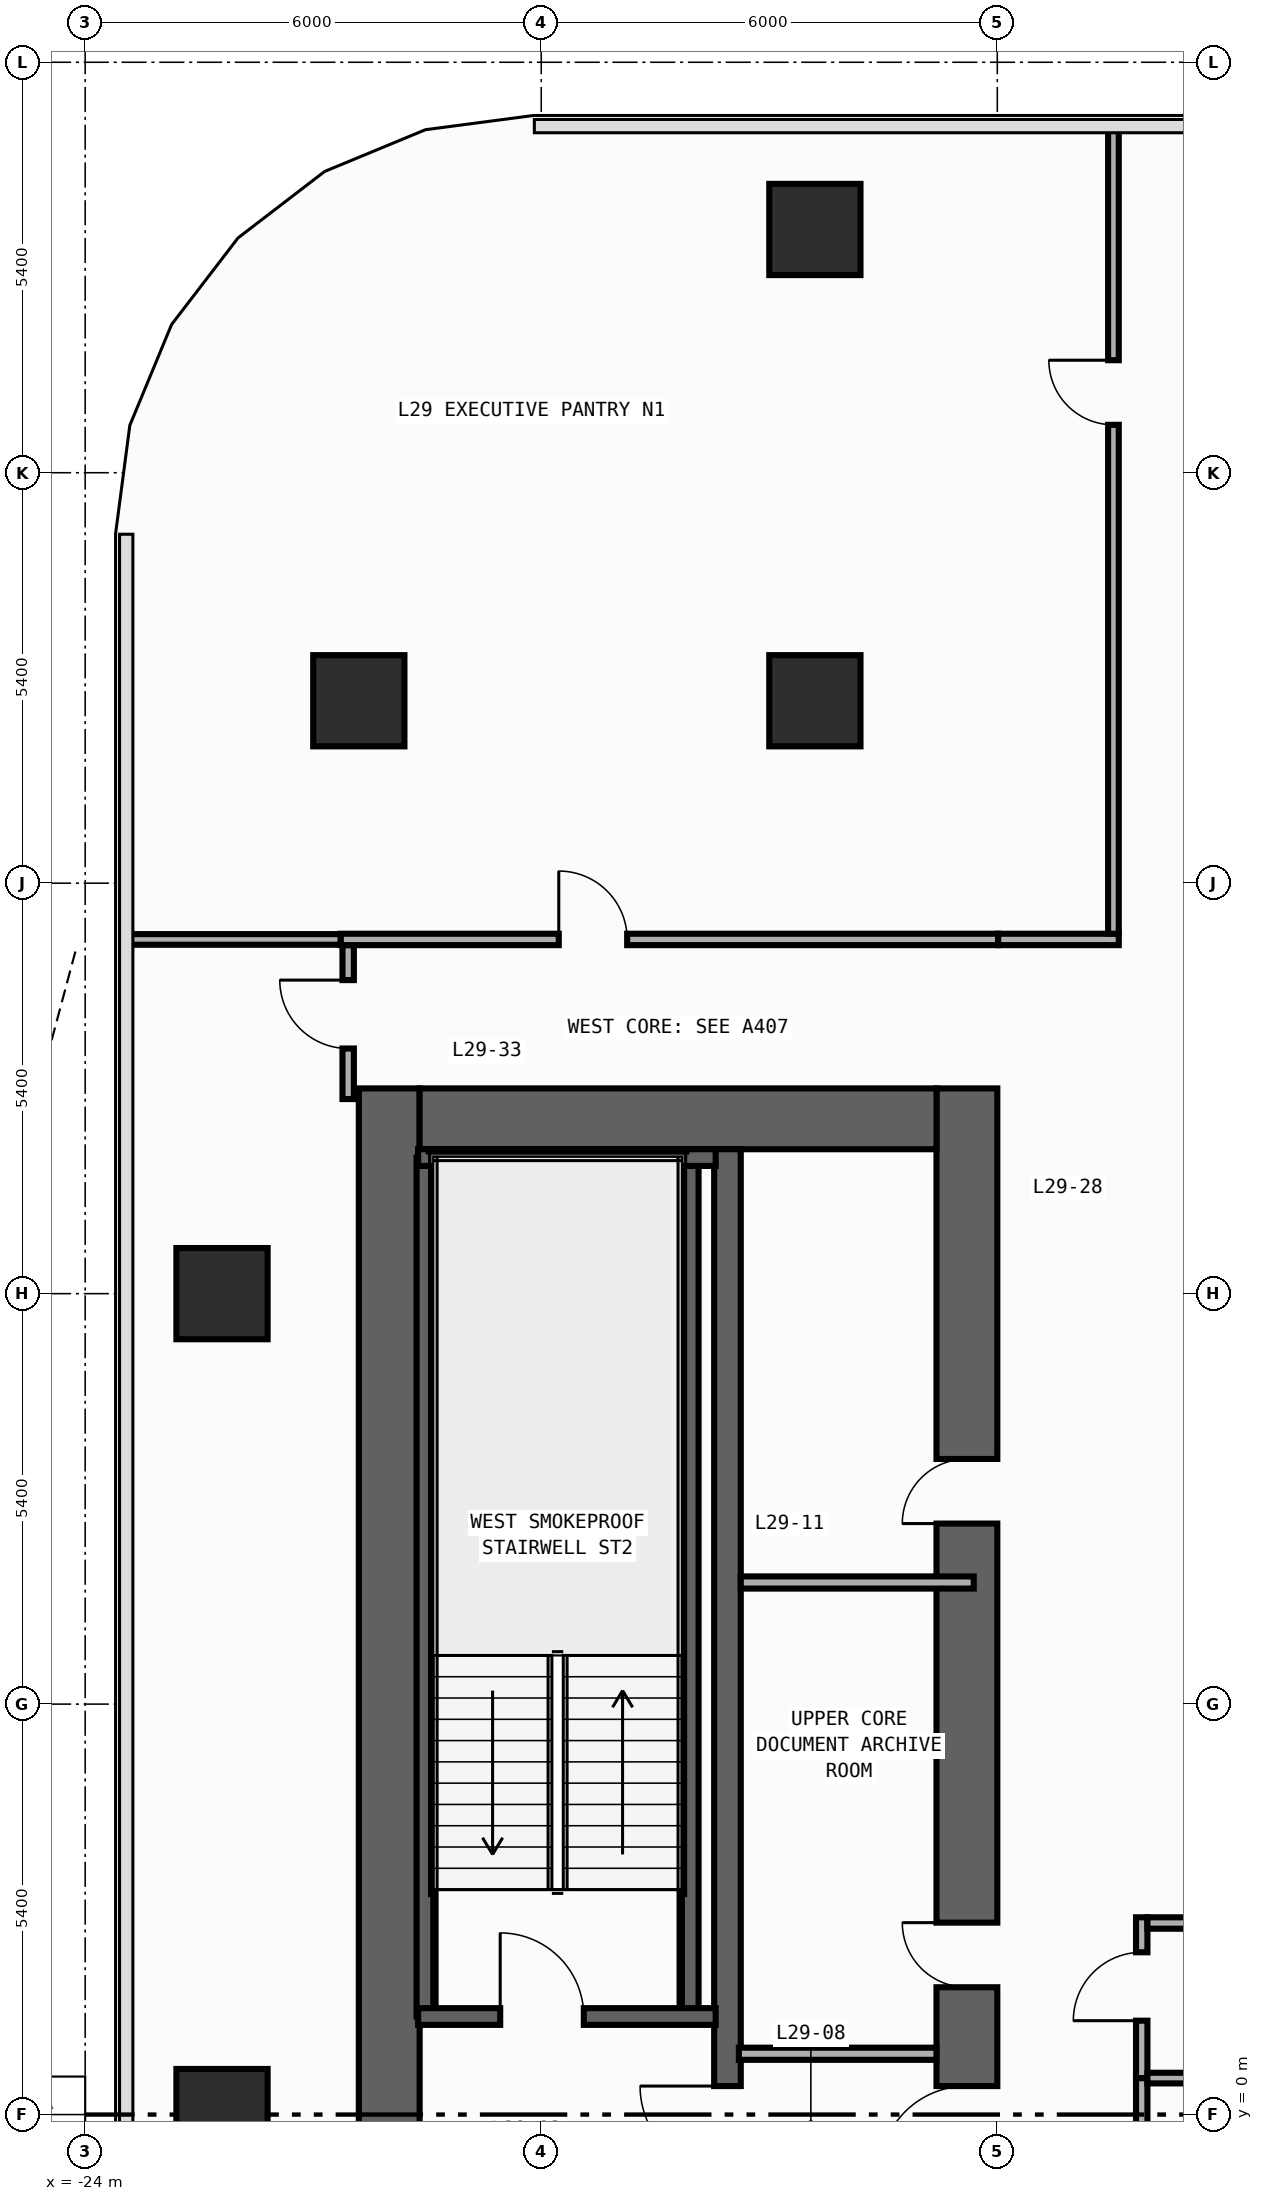
"""IFC4 building model, lengths in metres.
Left out: names, types, materials, properties, quantities, classifications, styles, units other than length and angle.
Written with IfcOpenShell. Run it as: python <this file> out.ifc"""

import sys

from ifc_helpers import new_model, si_unit, direction, frame, frame_2d, origin, origin_2d, place, context, subcontext, project, spatial, rectangle, extrude, element, fill, save


model = new_model("IFC4")
c1 = context("Model", 3, precision=1e-05, world=origin(), true_north=direction((0.0, 1.0)))
c2 = subcontext(c1, "Body", "Model", "MODEL_VIEW")
j1 = project(units=[si_unit("LENGTHUNIT", "METRE"), si_unit("PLANEANGLEUNIT", "RADIAN")], contexts=[c1])
p1 = place(None, origin())
s1 = spatial("IfcSite", under=j1, at=p1, CompositionType="ELEMENT")
p2 = place(p1, origin())
s2 = spatial("IfcBuilding", under=s1, at=p2, CompositionType="ELEMENT")
p3 = place(p2, frame((0.0, 0.0, 126.8)))
s3 = spatial("IfcBuildingStorey", under=s2, at=p3, CompositionType="ELEMENT", Elevation=126.8)
p4 = place(p3, frame((-20.0, -13.5, 0.0), z_axis=(0.0, 0.0, 1.0), x_axis=(0.0, 1.0, 0.0)))
e1 = element("IfcWall", 1, at=p4, inside=s3, PredefinedType="SHEAR", context=c2, shape_type="SweptSolid", body=[
    extrude(rectangle(XDim=27.0, YDim=0.8, at=frame_2d((13.5, 0.0))), origin(), (0.0, 0.0, 1.0), 3.94),
])
p5 = place(p3, frame((-12.4, -13.5, 0.0), z_axis=(0.0, 0.0, 1.0), x_axis=(0.0, 1.0, 0.0)))
e2 = element("IfcWall", 2, at=p5, inside=s3, PredefinedType="SHEAR", context=c2, shape_type="SweptSolid", body=[
    extrude(rectangle(XDim=27.0, YDim=0.8, at=frame_2d((13.5, 0.0))), origin(), (0.0, 0.0, 1.0), 3.94),
])
p6 = place(p5, frame((10.35, 0.0, 0.0)))
e3 = element("IfcOpeningElement", 3, at=p6, cuts=e2, PredefinedType="OPENING", context=c2, shape_type="SweptSolid", body=[
    extrude(rectangle(XDim=1.1, YDim=2.2, at=frame_2d((0.55, 1.1))), frame((0.0, 0.41, 0.0), z_axis=(0.0, -1.0, 0.0), x_axis=(1.0, 0.0, 0.0)), (0.0, 0.0, 1.0), 0.82),
])
p7 = place(p5, frame((7.15, 0.0, 0.0)))
e4 = element("IfcOpeningElement", 4, at=p7, cuts=e2, PredefinedType="OPENING", context=c2, shape_type="SweptSolid", body=[
    extrude(rectangle(XDim=1.1, YDim=2.2, at=frame_2d((0.55, 1.1))), frame((0.0, 0.41, 0.0), z_axis=(0.0, -1.0, 0.0), x_axis=(1.0, 0.0, 0.0)), (0.0, 0.0, 1.0), 0.82),
])
p8 = place(p5, frame((3.95, 0.0, 0.0)))
e5 = element("IfcOpeningElement", 5, at=p8, cuts=e2, PredefinedType="OPENING", context=c2, shape_type="SweptSolid", body=[
    extrude(rectangle(XDim=1.1, YDim=2.2, at=frame_2d((0.55, 1.1))), frame((0.0, 0.41, 0.0), z_axis=(0.0, -1.0, 0.0), x_axis=(1.0, 0.0, 0.0)), (0.0, 0.0, 1.0), 0.82),
])
p9 = place(p5, frame((15.175, 0.0, 0.0)))
e6 = element("IfcOpeningElement", 6, at=p9, cuts=e2, PredefinedType="OPENING", context=c2, shape_type="SweptSolid", body=[
    extrude(rectangle(XDim=0.85, YDim=2.1, at=frame_2d((0.425, 1.05))), frame((0.0, 0.41, 0.0), z_axis=(0.0, -1.0, 0.0), x_axis=(1.0, 0.0, 0.0)), (0.0, 0.0, 1.0), 0.82),
])
p10 = place(p5, frame((21.275, 0.0, 0.0)))
e7 = element("IfcOpeningElement", 7, at=p10, cuts=e2, PredefinedType="OPENING", context=c2, shape_type="SweptSolid", body=[
    extrude(rectangle(XDim=0.85, YDim=2.1, at=frame_2d((0.425, 1.05))), frame((0.0, 0.41, 0.0), z_axis=(0.0, -1.0, 0.0), x_axis=(1.0, 0.0, 0.0)), (0.0, 0.0, 1.0), 0.82),
])
p11 = place(p5, frame((12.725, 0.0, 0.0)))
e8 = element("IfcOpeningElement", 8, at=p11, cuts=e2, PredefinedType="OPENING", context=c2, shape_type="SweptSolid", body=[
    extrude(rectangle(XDim=1.15, YDim=2.2, at=frame_2d((0.575, 1.1))), frame((0.0, 0.41, 0.0), z_axis=(0.0, -1.0, 0.0), x_axis=(1.0, 0.0, 0.0)), (0.0, 0.0, 1.0), 0.82),
])
p12 = place(p5, frame((1.625, 0.0, 0.0)))
e9 = element("IfcOpeningElement", 9, at=p12, cuts=e2, PredefinedType="OPENING", context=c2, shape_type="SweptSolid", body=[
    extrude(rectangle(XDim=0.85, YDim=2.1, at=frame_2d((0.425, 1.05))), frame((0.0, 0.41, 0.0), z_axis=(0.0, -1.0, 0.0), x_axis=(1.0, 0.0, 0.0)), (0.0, 0.0, 1.0), 0.82),
])
p13 = place(p3, frame((-19.6, 13.1, 0.0), z_axis=(0.0, 0.0, 1.0), x_axis=(1.0, 0.0, 0.0)))
e10 = element("IfcWall", 10, at=p13, inside=s3, PredefinedType="SHEAR", context=c2, shape_type="SweptSolid", body=[
    extrude(rectangle(XDim=6.8, YDim=0.8, at=frame_2d((3.4, 0.0))), origin(), (0.0, 0.0, 1.0), 3.94),
])
p14 = place(p3, frame((-15.55, -12.7, 0.0), z_axis=(0.0, 0.0, 1.0), x_axis=(0.0, 1.0, 0.0)))
e11 = element("IfcWall", 11, at=p14, inside=s3, PredefinedType="SHEAR", context=c2, shape_type="SweptSolid", body=[
    extrude(rectangle(XDim=25.4, YDim=0.35, at=frame_2d((12.7, 0.0))), origin(), (0.0, 0.0, 1.0), 3.94),
])
p15 = place(p14, frame((11.925, 0.0, 0.0)))
e12 = element("IfcOpeningElement", 12, at=p15, cuts=e11, PredefinedType="OPENING", context=c2, shape_type="SweptSolid", body=[
    extrude(rectangle(XDim=1.15, YDim=2.2, at=frame_2d((0.575, 1.1))), frame((0.0, 0.185, 0.0), z_axis=(0.0, -1.0, 0.0), x_axis=(1.0, 0.0, 0.0)), (0.0, 0.0, 1.0), 0.37),
])
p16 = place(p14, frame((0.825, 0.0, 0.0)))
e13 = element("IfcOpeningElement", 13, at=p16, cuts=e11, PredefinedType="OPENING", context=c2, shape_type="SweptSolid", body=[
    extrude(rectangle(XDim=0.85, YDim=2.1, at=frame_2d((0.425, 1.05))), frame((0.0, 0.185, 0.0), z_axis=(0.0, -1.0, 0.0), x_axis=(1.0, 0.0, 0.0)), (0.0, 0.0, 1.0), 0.37),
])
for number, where, z_axis, x_axis in (
    (14, (-16.04, 1.29, 0.0), (0.0, 0.0, 1.0), (0.0, 1.0, 0.0)),
    (15, (-19.53, 1.29, 0.0), (0.0, 0.0, 1.0), (0.0, 1.0, 0.0)),
):
    element("IfcWall", number, at=place(p3, frame(where, z_axis=z_axis, x_axis=x_axis)), inside=s3, PredefinedType="SHEAR", context=c2, shape_type="SweptSolid", body=[
        extrude(rectangle(XDim=11.3, YDim=0.22, at=frame_2d((5.65, 0.0))), origin(), (0.0, 0.0, 1.0), 3.94),
    ])
p17 = place(p3, frame((-19.62, 12.59, 0.0), z_axis=(0.0, 0.0, 1.0), x_axis=(1.0, 0.0, 0.0)))
e16 = element("IfcWall", 16, at=p17, inside=s3, PredefinedType="SHEAR", context=c2, shape_type="SweptSolid", body=[
    extrude(rectangle(XDim=3.915, YDim=0.22, at=frame_2d((1.958, 0.0))), origin(), (0.0, 0.0, 1.0), 3.94),
])
p18 = place(p3, frame((-19.62, 1.29, 0.0), z_axis=(0.0, 0.0, 1.0), x_axis=(1.0, 0.0, 0.0)))
e17 = element("IfcWall", 17, at=p18, inside=s3, PredefinedType="SHEAR", context=c2, shape_type="SweptSolid", body=[
    extrude(rectangle(XDim=3.915, YDim=0.22, at=frame_2d((1.958, 0.0))), origin(), (0.0, 0.0, 1.0), 3.94),
])
p19 = place(p18, frame((1.08, 0.0, 0.0)))
e18 = element("IfcOpeningElement", 18, at=p19, cuts=e17, PredefinedType="OPENING", context=c2, shape_type="SweptSolid", body=[
    extrude(rectangle(XDim=1.1, YDim=2.2, at=frame_2d((0.55, 1.1))), frame((0.0, 0.12, 0.0), z_axis=(0.0, -1.0, 0.0), x_axis=(1.0, 0.0, 0.0)), (0.0, 0.0, 1.0), 0.24),
])
for number, where, z_axis, x_axis in (
    (19, (-20.4, 18.6, 0.0), (0.0, 0.0, 1.0), (1.0, 0.0, 0.0)),
    (20, (-14.4, 18.6, 0.0), (0.0, 0.0, 1.0), (1.0, 0.0, 0.0)),
    (21, (-22.2, 0.0, 0.0), (0.0, 0.0, 1.0), (1.0, 0.0, 0.0)),
    (22, (-22.2, 10.8, 0.0), (0.0, 0.0, 1.0), (1.0, 0.0, 0.0)),
    (23, (-14.4, 24.8, 0.0), (0.0, 0.0, 1.0), (1.0, 0.0, 0.0)),
):
    element("IfcColumn", number, at=place(p3, frame(where, z_axis=z_axis, x_axis=x_axis)), inside=s3, PredefinedType="COLUMN", context=c2, shape_type="SweptSolid", body=[
        extrude(rectangle(XDim=1.2, YDim=1.2, at=origin_2d()), origin(), (0.0, 0.0, 1.0), 4.2),
    ])
p20 = place(p3, frame((-15.4, 0.8, 0.0), z_axis=(0.0, 0.0, 1.0), x_axis=(1.0, 0.0, 0.0)))
e24 = element("IfcWall", 24, at=p20, inside=s3, PredefinedType="STANDARD", context=c2, shape_type="SweptSolid", body=[
    extrude(rectangle(XDim=2.6, YDim=0.16, at=frame_2d((1.3, 0.0))), origin(), (0.0, 0.0, 1.0), 3.94),
])
p21 = place(p3, frame((-15.375, 7.0, 0.0), z_axis=(0.0, 0.0, 1.0), x_axis=(1.0, 0.0, 0.0)))
e25 = element("IfcWall", 25, at=p21, inside=s3, PredefinedType="PARTITIONING", context=c2, shape_type="SweptSolid", body=[
    extrude(rectangle(XDim=3.065, YDim=0.16, at=frame_2d((1.532, 0.0))), origin(), (0.0, 0.0, 1.0), 3.94),
])
p22 = place(p3, frame((-11.99, 15.46, 0.0), z_axis=(0.0, 0.0, 1.0), x_axis=(1.0, 0.0, 0.0)))
e26 = element("IfcWall", 26, at=p22, inside=s3, PredefinedType="PARTITIONING", context=c2, shape_type="SweptSolid", body=[
    extrude(rectangle(XDim=1.588, YDim=0.15, at=frame_2d((0.794, 0.0))), origin(), (0.0, 0.0, 1.0), 3.94),
])
p23 = place(p3, frame((-10.1, -3.795, 0.0), z_axis=(0.0, 0.0, 1.0), x_axis=(0.0, 1.0, 0.0)))
e27 = element("IfcWall", 27, at=p23, inside=s3, PredefinedType="PARTITIONING", context=c2, shape_type="SweptSolid", body=[
    extrude(rectangle(XDim=4.275, YDim=0.15, at=frame_2d((2.137, 0.0))), origin(), (0.0, 0.0, 1.0), 3.94),
])
p24 = place(p23, frame((0.46, 0.0, 0.0)))
e28 = element("IfcOpeningElement", 28, at=p24, cuts=e27, PredefinedType="OPENING", context=c2, shape_type="SweptSolid", body=[
    extrude(rectangle(XDim=0.9, YDim=2.15, at=frame_2d((0.45, 1.075))), frame((0.0, 0.085, 0.0), z_axis=(0.0, -1.0, 0.0), x_axis=(1.0, 0.0, 0.0)), (0.0, 0.0, 1.0), 0.17),
])
p25 = place(p3, frame((-10.1, 0.48, 0.0), z_axis=(0.0, 0.0, 1.0), x_axis=(0.0, 1.0, 0.0)))
e29 = element("IfcWall", 29, at=p25, inside=s3, PredefinedType="PARTITIONING", context=c2, shape_type="SweptSolid", body=[
    extrude(rectangle(XDim=2.115, YDim=0.15, at=frame_2d((1.058, 0.0))), origin(), (0.0, 0.0, 1.0), 3.94),
])
p26 = place(p25, frame((0.755, 0.0, 0.0)))
e30 = element("IfcOpeningElement", 30, at=p26, cuts=e29, PredefinedType="OPENING", context=c2, shape_type="SweptSolid", body=[
    extrude(rectangle(XDim=0.9, YDim=2.15, at=frame_2d((0.45, 1.075))), frame((0.0, 0.085, 0.0), z_axis=(0.0, -1.0, 0.0), x_axis=(1.0, 0.0, 0.0)), (0.0, 0.0, 1.0), 0.17),
])
p27 = place(p3, frame((-10.025, 2.52, 0.0), z_axis=(0.0, 0.0, 1.0), x_axis=(1.0, 0.0, 0.0)))
e31 = element("IfcWall", 31, at=p27, inside=s3, PredefinedType="PARTITIONING", context=c2, shape_type="SweptSolid", body=[
    extrude(rectangle(XDim=14.22, YDim=0.15, at=frame_2d((7.11, 0.0))), origin(), (0.0, 0.0, 1.0), 3.94),
])
p28 = place(p27, frame((9.607, 0.0, 0.0)))
e32 = element("IfcOpeningElement", 32, at=p28, cuts=e31, PredefinedType="OPENING", context=c2, shape_type="SweptSolid", body=[
    extrude(rectangle(XDim=0.9, YDim=2.15, at=frame_2d((0.45, 1.075))), frame((0.0, 0.085, 0.0), z_axis=(0.0, -1.0, 0.0), x_axis=(1.0, 0.0, 0.0)), (0.0, 0.0, 1.0), 0.17),
])
p29 = place(p3, frame((-20.54, 13.36, 0.0), z_axis=(0.0, 0.0, 1.0), x_axis=(0.0, 1.0, 0.0)))
e33 = element("IfcWall", 33, at=p29, inside=s3, PredefinedType="PARTITIONING", context=c2, shape_type="SweptSolid", body=[
    extrude(rectangle(XDim=2.025, YDim=0.15, at=frame_2d((1.012, 0.0))), origin(), (0.0, 0.0, 1.0), 3.94),
])
p30 = place(p29, frame((0.665, 0.0, 0.0)))
e34 = element("IfcOpeningElement", 34, at=p30, cuts=e33, PredefinedType="OPENING", context=c2, shape_type="SweptSolid", body=[
    extrude(rectangle(XDim=0.9, YDim=2.15, at=frame_2d((0.45, 1.075))), frame((0.0, 0.085, 0.0), z_axis=(0.0, -1.0, 0.0), x_axis=(1.0, 0.0, 0.0)), (0.0, 0.0, 1.0), 0.17),
])
p31 = place(p3, frame((-20.64, 15.46, 0.0), z_axis=(0.0, 0.0, 1.0), x_axis=(1.0, 0.0, 0.0)))
e35 = element("IfcWall", 35, at=p31, inside=s3, PredefinedType="PARTITIONING", context=c2, shape_type="SweptSolid", body=[
    extrude(rectangle(XDim=8.65, YDim=0.15, at=frame_2d((4.325, 0.0))), origin(), (0.0, 0.0, 1.0), 3.94),
])
p32 = place(p31, frame((2.871, 0.0, 0.0)))
e36 = element("IfcOpeningElement", 36, at=p32, cuts=e35, PredefinedType="OPENING", context=c2, shape_type="SweptSolid", body=[
    extrude(rectangle(XDim=0.9, YDim=2.15, at=frame_2d((0.45, 1.075))), frame((0.0, 0.085, 0.0), z_axis=(0.0, -1.0, 0.0), x_axis=(1.0, 0.0, 0.0)), (0.0, 0.0, 1.0), 0.17),
])
p33 = place(p3, frame((-23.455, 15.46, 0.0), z_axis=(0.0, 0.0, 1.0), x_axis=(1.0, 0.0, 0.0)))
e37 = element("IfcWall", 37, at=p33, inside=s3, PredefinedType="PARTITIONING", context=c2, shape_type="SweptSolid", body=[
    extrude(rectangle(XDim=2.815, YDim=0.14, at=frame_2d((1.408, 0.0))), origin(), (0.0, 0.0, 1.0), 3.94),
])
p34 = place(p3, frame((-10.472, 15.535, 0.0), z_axis=(0.0, 0.0, 1.0), x_axis=(0.0, 1.0, 0.0)))
e38 = element("IfcWall", 38, at=p34, inside=s3, PredefinedType="PARTITIONING", context=c2, shape_type="SweptSolid", body=[
    extrude(rectangle(XDim=10.62, YDim=0.14, at=frame_2d((5.31, 0.0))), origin(), (0.0, 0.0, 1.0), 3.94),
])
p35 = place(p34, frame((6.695, 0.0, 0.0)))
e39 = element("IfcOpeningElement", 39, at=p35, cuts=e38, PredefinedType="OPENING", context=c2, shape_type="SweptSolid", body=[
    extrude(rectangle(XDim=0.85, YDim=2.1, at=frame_2d((0.425, 1.05))), frame((0.0, 0.08, 0.0), z_axis=(0.0, -1.0, 0.0), x_axis=(1.0, 0.0, 0.0)), (0.0, 0.0, 1.0), 0.16),
])
p36 = place(p3, frame((-10.025, 0.48, 0.0), z_axis=(0.0, 0.0, 1.0), x_axis=(1.0, 0.0, 0.0)))
e40 = element("IfcWall", 40, at=p36, inside=s3, PredefinedType="PARTITIONING", context=c2, shape_type="SweptSolid", body=[
    extrude(rectangle(XDim=4.465, YDim=0.14, at=frame_2d((2.232, 0.0))), origin(), (0.0, 0.0, 1.0), 3.94),
])
p37 = place(p19, origin())
e41 = element("IfcDoor", 41, at=p37, inside=s3, OperationType="SINGLE_SWING_LEFT", PredefinedType="DOOR", context=c2, shape_type="SweptSolid", body=[
    extrude(rectangle(XDim=1.1, YDim=2.2, at=frame_2d((0.55, 1.1))), frame((0.0, 0.025, 0.0), z_axis=(0.0, -1.0, 0.0), x_axis=(1.0, 0.0, 0.0)), (0.0, 0.0, 1.0), 0.05),
])
fill(e18, e41)
p38 = place(p9, origin())
e42 = element("IfcDoor", 42, at=p38, inside=s3, OperationType="SINGLE_SWING_RIGHT", PredefinedType="DOOR", context=c2, shape_type="SweptSolid", body=[
    extrude(rectangle(XDim=0.85, YDim=2.1, at=frame_2d((0.425, 1.05))), frame((0.0, 0.025, 0.0), z_axis=(0.0, -1.0, 0.0), x_axis=(1.0, 0.0, 0.0)), (0.0, 0.0, 1.0), 0.05),
])
fill(e6, e42)
p39 = place(p10, origin())
e43 = element("IfcDoor", 43, at=p39, inside=s3, OperationType="SINGLE_SWING_LEFT", PredefinedType="DOOR", context=c2, shape_type="SweptSolid", body=[
    extrude(rectangle(XDim=0.85, YDim=2.1, at=frame_2d((0.425, 1.05))), frame((0.0, 0.025, 0.0), z_axis=(0.0, -1.0, 0.0), x_axis=(1.0, 0.0, 0.0)), (0.0, 0.0, 1.0), 0.05),
])
fill(e7, e43)
p40 = place(p11, origin())
e44 = element("IfcDoor", 44, at=p40, inside=s3, OperationType="SINGLE_SWING_LEFT", PredefinedType="DOOR", context=c2, shape_type="SweptSolid", body=[
    extrude(rectangle(XDim=1.15, YDim=2.2, at=frame_2d((0.575, 1.1))), frame((0.0, 0.025, 0.0), z_axis=(0.0, -1.0, 0.0), x_axis=(1.0, 0.0, 0.0)), (0.0, 0.0, 1.0), 0.05),
])
fill(e8, e44)
p41 = place(p15, origin())
e45 = element("IfcDoor", 45, at=p41, inside=s3, OperationType="SINGLE_SWING_RIGHT", PredefinedType="DOOR", context=c2, shape_type="SweptSolid", body=[
    extrude(rectangle(XDim=1.15, YDim=2.2, at=frame_2d((0.575, 1.1))), frame((0.0, 0.025, 0.0), z_axis=(0.0, -1.0, 0.0), x_axis=(1.0, 0.0, 0.0)), (0.0, 0.0, 1.0), 0.05),
])
fill(e12, e45)
p42 = place(p26, origin())
e46 = element("IfcDoor", 46, at=p42, inside=s3, OperationType="SINGLE_SWING_LEFT", PredefinedType="DOOR", context=c2, shape_type="SweptSolid", body=[
    extrude(rectangle(XDim=0.9, YDim=2.15, at=frame_2d((0.45, 1.075))), frame((0.0, 0.025, 0.0), z_axis=(0.0, -1.0, 0.0), x_axis=(1.0, 0.0, 0.0)), (0.0, 0.0, 1.0), 0.05),
])
fill(e30, e46)
p43 = place(p30, origin())
e47 = element("IfcDoor", 47, at=p43, inside=s3, OperationType="SINGLE_SWING_RIGHT", PredefinedType="DOOR", context=c2, shape_type="SweptSolid", body=[
    extrude(rectangle(XDim=0.9, YDim=2.15, at=frame_2d((0.45, 1.075))), frame((0.0, 0.025, 0.0), z_axis=(0.0, -1.0, 0.0), x_axis=(1.0, 0.0, 0.0)), (0.0, 0.0, 1.0), 0.05),
])
fill(e34, e47)
p44 = place(p32, origin())
e48 = element("IfcDoor", 48, at=p44, inside=s3, OperationType="SINGLE_SWING_LEFT", PredefinedType="DOOR", context=c2, shape_type="SweptSolid", body=[
    extrude(rectangle(XDim=0.9, YDim=2.15, at=frame_2d((0.45, 1.075))), frame((0.0, 0.025, 0.0), z_axis=(0.0, -1.0, 0.0), x_axis=(1.0, 0.0, 0.0)), (0.0, 0.0, 1.0), 0.05),
])
fill(e36, e48)
p45 = place(p35, origin())
e49 = element("IfcDoor", 49, at=p45, inside=s3, OperationType="SINGLE_SWING_RIGHT", PredefinedType="DOOR", context=c2, shape_type="SweptSolid", body=[
    extrude(rectangle(XDim=0.85, YDim=2.1, at=frame_2d((0.425, 1.05))), frame((0.0, 0.025, 0.0), z_axis=(0.0, -1.0, 0.0), x_axis=(1.0, 0.0, 0.0)), (0.0, 0.0, 1.0), 0.05),
])
fill(e39, e49)
save(model, sys.argv[1])
